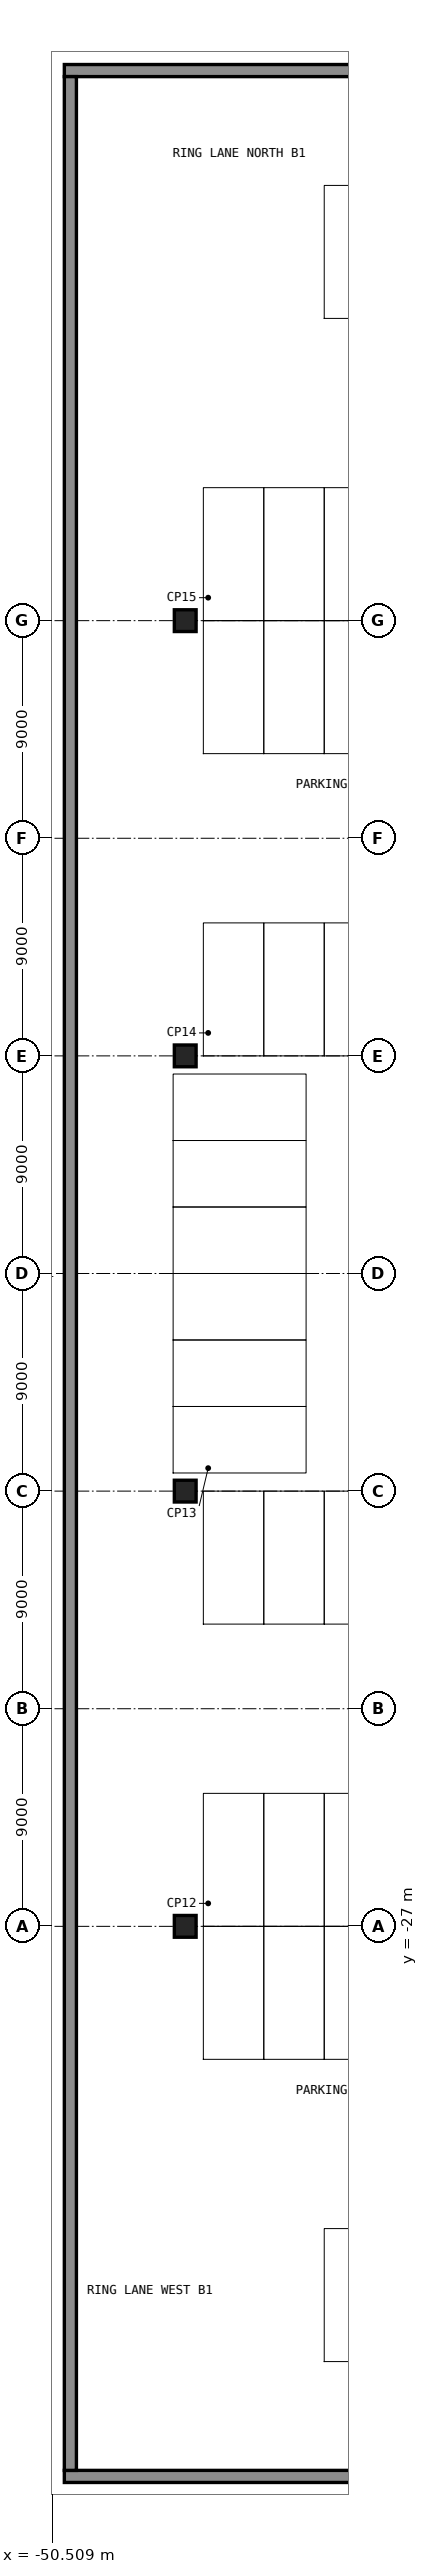
"""IFC4 building model, lengths in metres.
Left out: names, types, materials, properties, quantities, classifications, styles, units other than length and angle.
Written with IfcOpenShell. Run it as: python <this file> out.ifc"""

import sys

from ifc_helpers import new_model, si_unit, direction, frame, frame_2d, origin, origin_2d, place, context, subcontext, project, spatial, rectangle, extrude, element, save


model = new_model("IFC4")
c1 = context("Model", 3, precision=1e-05, world=origin(), true_north=direction((0.0, 1.0)))
c2 = subcontext(c1, "Body", "Model", "MODEL_VIEW")
j1 = project(units=[si_unit("LENGTHUNIT", "METRE"), si_unit("PLANEANGLEUNIT", "RADIAN")], contexts=[c1])
p1 = place(None, origin())
s1 = spatial("IfcSite", under=j1, at=p1, CompositionType="ELEMENT")
p2 = place(p1, origin())
s2 = spatial("IfcBuilding", under=s1, at=p2, CompositionType="ELEMENT")
p3 = place(p2, frame((0.0, 0.0, -4.5)))
s3 = spatial("IfcBuildingStorey", under=s2, at=p3, CompositionType="ELEMENT", Elevation=-4.5)
for number, where, z_axis, x_axis in (
    (1, (-50.0, 49.75, -0.3), (0.0, 0.0, 1.0), (1.0, 0.0, 0.0)),
    (2, (-50.0, -49.75, -0.3), (0.0, 0.0, 1.0), (1.0, 0.0, 0.0)),
):
    element("IfcWall", number, at=place(p3, frame(where, z_axis=z_axis, x_axis=x_axis)), inside=s3, PredefinedType="SOLIDWALL", context=c2, shape_type="SweptSolid", body=[
        extrude(rectangle(XDim=100.0, YDim=0.5, at=frame_2d((50.0, 0.0))), origin(), (0.0, 0.0, 1.0), 4.8),
    ])
p4 = place(p3, frame((-49.75, -49.5, -0.3), z_axis=(0.0, 0.0, 1.0), x_axis=(0.0, 1.0, 0.0)))
e3 = element("IfcWall", 3, at=p4, inside=s3, PredefinedType="SOLIDWALL", context=c2, shape_type="SweptSolid", body=[
    extrude(rectangle(XDim=99.0, YDim=0.5, at=frame_2d((49.5, 0.0))), origin(), (0.0, 0.0, 1.0), 4.8),
])
for number, where, z_axis, x_axis in (
    (4, (-45.0, -27.0, -0.3), (0.0, 0.0, 1.0), (1.0, 0.0, 0.0)),
    (5, (-45.0, -9.0, -0.3), (0.0, 0.0, 1.0), (1.0, 0.0, 0.0)),
    (6, (-45.0, 9.0, -0.3), (0.0, 0.0, 1.0), (1.0, 0.0, 0.0)),
    (7, (-45.0, 27.0, -0.3), (0.0, 0.0, 1.0), (1.0, 0.0, 0.0)),
):
    element("IfcColumn", number, at=place(p3, frame(where, z_axis=z_axis, x_axis=x_axis)), inside=s3, PredefinedType="COLUMN", context=c2, shape_type="SweptSolid", body=[
        extrude(rectangle(XDim=0.9, YDim=0.9, at=origin_2d()), origin(), (0.0, 0.0, 1.0), 4.4),
    ])
save(model, sys.argv[1])
